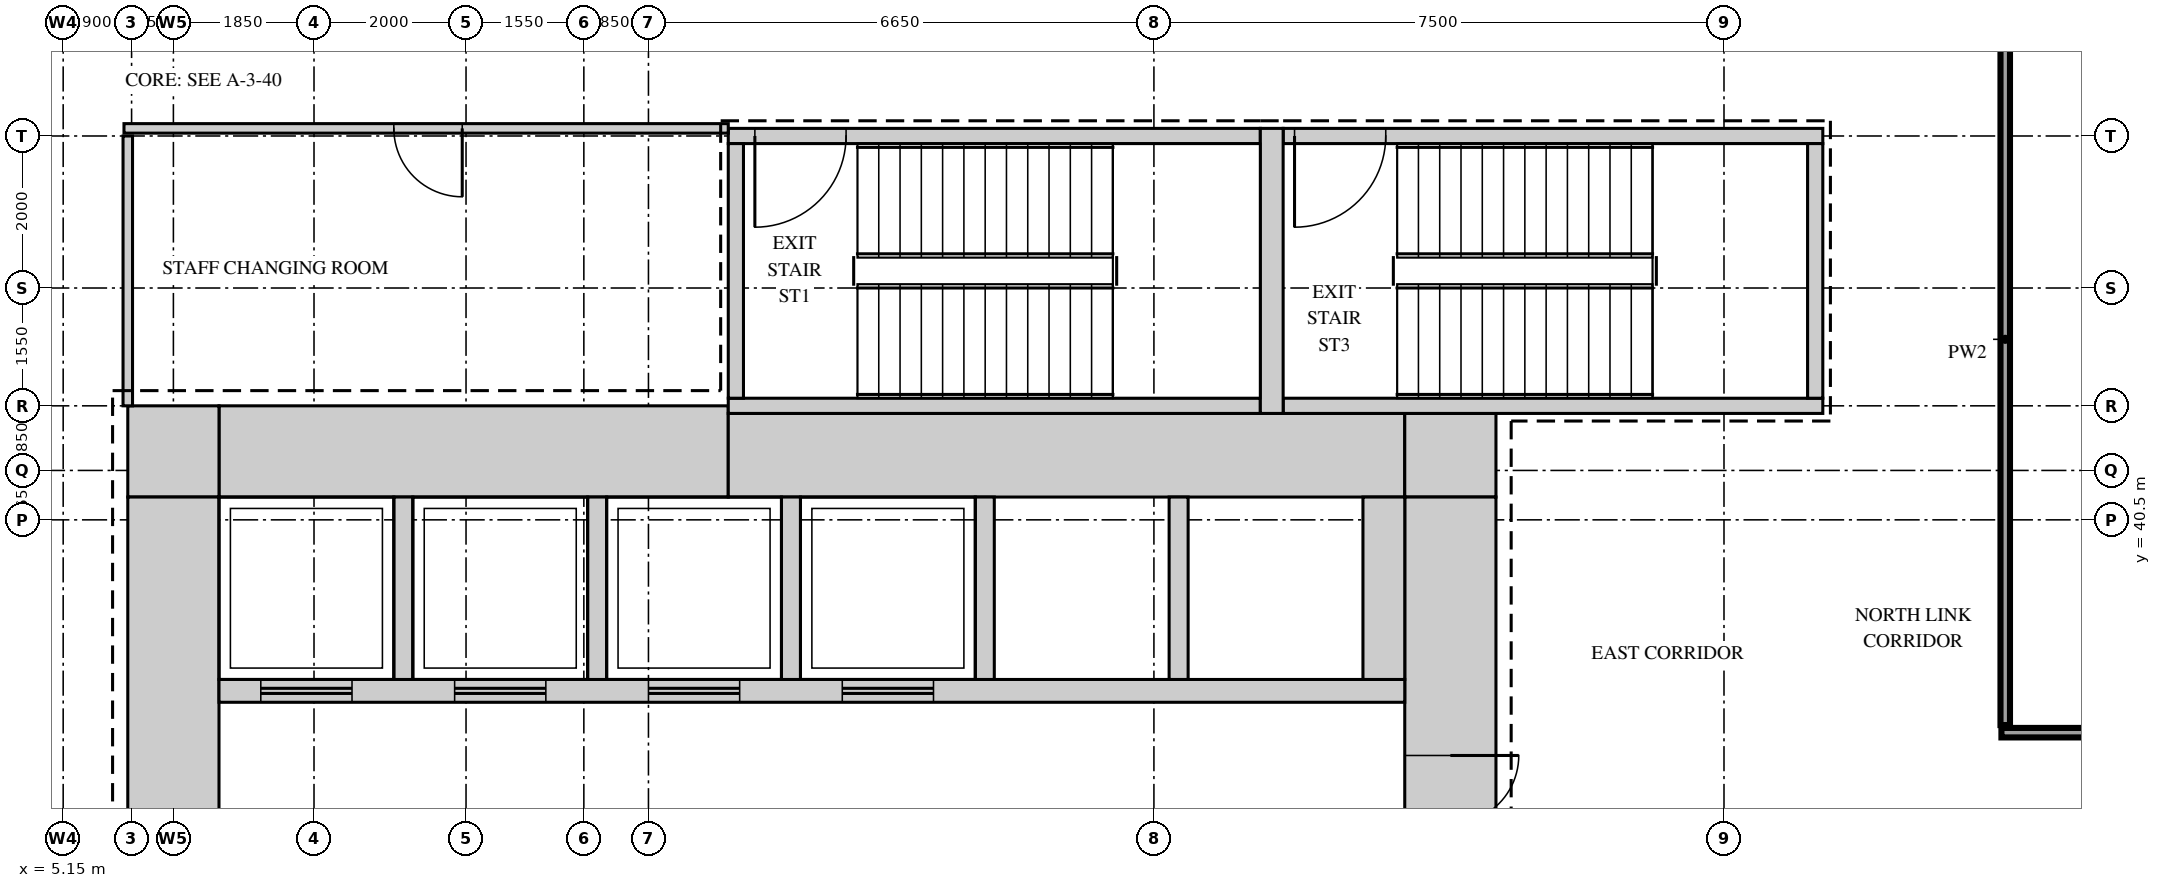
"""IFC4 building model, lengths in metres.
Left out: names, types, materials, properties, quantities, classifications, styles, units other than length and angle.
Written with IfcOpenShell. Run it as: python <this file> out.ifc"""

import sys

from ifc_helpers import new_model, si_unit, direction, frame, frame_2d, origin, place, context, subcontext, project, spatial, rectangle, extrude, source, transform, mapped, element, fill, save


model = new_model("IFC4")
c1 = context("Model", 3, precision=1e-05, world=origin(), true_north=direction((0.0, 1.0)))
c2 = subcontext(c1, "Body", "Model", "MODEL_VIEW")
j1 = project(units=[si_unit("LENGTHUNIT", "METRE"), si_unit("PLANEANGLEUNIT", "RADIAN")], contexts=[c1])
p1 = place(None, origin())
s1 = spatial("IfcSite", under=j1, at=p1, CompositionType="ELEMENT")
p2 = place(p1, origin())
s2 = spatial("IfcBuilding", under=s1, at=p2, CompositionType="ELEMENT")
p3 = place(p2, frame((0.0, 0.0, 73.5)))
s3 = spatial("IfcBuildingStorey", under=s2, at=p3, CompositionType="ELEMENT", Elevation=73.5)
m1 = source(origin(), c2, "Body", "SweptSolid", [
    extrude(rectangle(XDim=6.7, YDim=1.2, at=frame_2d((3.35, 0.0))), origin(), (0.0, 0.0, 1.0), 4.2),
])
p4 = place(p3, frame((7.2, 41.4, 0.0), z_axis=(0.0, 0.0, 1.0), x_axis=(1.0, 0.0, 0.0)))
e1 = element("IfcWall", 1, at=p4, inside=s3, PredefinedType="SHEAR", context=c2, shape_type="MappedRepresentation", body=[
    mapped(m1, transform((0.0, 0.0, 0.0))),
])
m2 = source(origin(), c2, "Body", "SweptSolid", [
    extrude(rectangle(XDim=8.9, YDim=1.1, at=frame_2d((4.45, 0.0))), origin(), (0.0, 0.0, 1.0), 4.2),
])
p5 = place(p3, frame((13.9, 41.35, 0.0), z_axis=(0.0, 0.0, 1.0), x_axis=(1.0, 0.0, 0.0)))
e2 = element("IfcWall", 2, at=p5, inside=s3, PredefinedType="SHEAR", context=c2, shape_type="MappedRepresentation", body=[
    mapped(m2, transform((0.0, 0.0, 0.0))),
])
m3 = source(origin(), c2, "Body", "SweptSolid", [
    extrude(rectangle(XDim=1.2, YDim=1.1, at=frame_2d((0.6, 0.0))), origin(), (0.0, 0.0, 1.0), 4.2),
])
p6 = place(p3, frame((22.8, 41.35, 0.0), z_axis=(0.0, 0.0, 1.0), x_axis=(1.0, 0.0, 0.0)))
e3 = element("IfcWall", 3, at=p6, inside=s3, PredefinedType="SHEAR", context=c2, shape_type="MappedRepresentation", body=[
    mapped(m3, transform((0.0, 0.0, 0.0))),
])
m4 = source(origin(), c2, "Body", "SweptSolid", [
    extrude(rectangle(XDim=1.2, YDim=1.2, at=frame_2d((0.6, 0.0))), origin(), (0.0, 0.0, 1.0), 4.2),
])
p7 = place(p3, frame((6.0, 41.4, 0.0), z_axis=(0.0, 0.0, 1.0), x_axis=(1.0, 0.0, 0.0)))
e4 = element("IfcWall", 4, at=p7, inside=s3, PredefinedType="SHEAR", context=c2, shape_type="MappedRepresentation", body=[
    mapped(m4, transform((0.0, 0.0, 0.0))),
])
m5 = source(origin(), c2, "Body", "SweptSolid", [
    extrude(rectangle(XDim=27.6, YDim=1.2, at=frame_2d((13.8, 0.0))), origin(), (0.0, 0.0, 1.0), 4.2),
])
p8 = place(p3, frame((23.4, 13.2, 0.0), z_axis=(0.0, 0.0, 1.0), x_axis=(0.0, 1.0, 0.0)))
e5 = element("IfcWall", 5, at=p8, inside=s3, PredefinedType="SHEAR", context=c2, shape_type="MappedRepresentation", body=[
    mapped(m5, transform((0.0, 0.0, 0.0))),
])
m6 = source(origin(), c2, "Body", "SweptSolid", [
    extrude(rectangle(XDim=1.8, YDim=2.1, at=frame_2d((0.9, 1.05))), frame((0.0, 0.61, 0.0), z_axis=(0.0, -1.0, 0.0), x_axis=(1.0, 0.0, 0.0)), (0.0, 0.0, 1.0), 1.22),
])
p9 = place(p8, frame((22.4, 0.0, 0.0)))
e6 = element("IfcOpeningElement", 6, at=p9, cuts=e5, PredefinedType="OPENING", context=c2, shape_type="MappedRepresentation", body=[
    mapped(m6, transform((0.0, 0.0, 0.0))),
])
m7 = source(origin(), c2, "Body", "SweptSolid", [
    extrude(rectangle(XDim=1.2, YDim=2.1, at=frame_2d((0.6, 1.05))), frame((0.0, 0.61, 0.0), z_axis=(0.0, -1.0, 0.0), x_axis=(1.0, 0.0, 0.0)), (0.0, 0.0, 1.0), 1.22),
])
p10 = place(p8, frame((14.4, 0.0, 0.0)))
e7 = element("IfcOpeningElement", 7, at=p10, cuts=e5, PredefinedType="OPENING", context=c2, shape_type="MappedRepresentation", body=[
    mapped(m7, transform((0.0, 0.0, 0.0))),
])
m8 = source(origin(), c2, "Body", "SweptSolid", [
    extrude(rectangle(XDim=0.9, YDim=2.1, at=frame_2d((0.45, 1.05))), frame((0.0, 0.61, 0.0), z_axis=(0.0, -1.0, 0.0), x_axis=(1.0, 0.0, 0.0)), (0.0, 0.0, 1.0), 1.22),
])
p11 = place(p8, frame((1.15, 0.0, 0.0)))
e8 = element("IfcOpeningElement", 8, at=p11, cuts=e5, PredefinedType="OPENING", context=c2, shape_type="MappedRepresentation", body=[
    mapped(m8, transform((0.0, 0.0, 0.0))),
])
p12 = place(p8, frame((6.0, 0.0, 0.0)))
e9 = element("IfcOpeningElement", 9, at=p12, cuts=e5, PredefinedType="OPENING", context=c2, shape_type="MappedRepresentation", body=[
    mapped(m8, transform((0.0, 0.0, 0.0))),
])
p13 = place(p3, frame((6.6, 13.2, 0.0), z_axis=(0.0, 0.0, 1.0), x_axis=(0.0, 1.0, 0.0)))
e10 = element("IfcWall", 10, at=p13, inside=s3, PredefinedType="SHEAR", context=c2, shape_type="MappedRepresentation", body=[
    mapped(m5, transform((0.0, 0.0, 0.0))),
])
m9 = source(origin(), c2, "Body", "SweptSolid", [
    extrude(rectangle(XDim=7.0, YDim=0.2, at=frame_2d((3.5, 0.0))), origin(), (0.0, 0.0, 1.0), 4.2),
])
p14 = place(p3, frame((13.9, 45.55, 0.0), z_axis=(0.0, 0.0, 1.0), x_axis=(1.0, 0.0, 0.0)))
e11 = element("IfcWall", 11, at=p14, inside=s3, PredefinedType="SHEAR", context=c2, shape_type="MappedRepresentation", body=[
    mapped(m9, transform((0.0, 0.0, 0.0))),
])
m10 = source(origin(), c2, "Body", "SweptSolid", [
    extrude(rectangle(XDim=1.2, YDim=2.1, at=frame_2d((0.6, 1.05))), frame((0.0, 0.11, 0.0), z_axis=(0.0, -1.0, 0.0), x_axis=(1.0, 0.0, 0.0)), (0.0, 0.0, 1.0), 0.22),
])
p15 = place(p14, frame((0.35, 0.0, 0.0)))
e12 = element("IfcOpeningElement", 12, at=p15, cuts=e11, PredefinedType="OPENING", context=c2, shape_type="MappedRepresentation", body=[
    mapped(m10, transform((0.0, 0.0, 0.0))),
])
p16 = place(p3, frame((13.9, 42.0, 0.0), z_axis=(0.0, 0.0, 1.0), x_axis=(1.0, 0.0, 0.0)))
e13 = element("IfcWall", 13, at=p16, inside=s3, PredefinedType="SHEAR", context=c2, shape_type="MappedRepresentation", body=[
    mapped(m9, transform((0.0, 0.0, 0.0))),
])
m11 = source(origin(), c2, "Body", "SweptSolid", [
    extrude(rectangle(XDim=7.1, YDim=0.2, at=frame_2d((3.55, 0.0))), origin(), (0.0, 0.0, 1.0), 4.2),
])
p17 = place(p3, frame((21.2, 45.55, 0.0), z_axis=(0.0, 0.0, 1.0), x_axis=(1.0, 0.0, 0.0)))
e14 = element("IfcWall", 14, at=p17, inside=s3, PredefinedType="SHEAR", context=c2, shape_type="MappedRepresentation", body=[
    mapped(m11, transform((0.0, 0.0, 0.0))),
])
p18 = place(p17, frame((0.15, 0.0, 0.0)))
e15 = element("IfcOpeningElement", 15, at=p18, cuts=e14, PredefinedType="OPENING", context=c2, shape_type="MappedRepresentation", body=[
    mapped(m10, transform((0.0, 0.0, 0.0))),
])
p19 = place(p3, frame((21.2, 42.0, 0.0), z_axis=(0.0, 0.0, 1.0), x_axis=(1.0, 0.0, 0.0)))
e16 = element("IfcWall", 16, at=p19, inside=s3, PredefinedType="SHEAR", context=c2, shape_type="MappedRepresentation", body=[
    mapped(m11, transform((0.0, 0.0, 0.0))),
])
m12 = source(origin(), c2, "Body", "SweptSolid", [
    extrude(rectangle(XDim=3.75, YDim=0.3, at=frame_2d((1.875, 0.0))), origin(), (0.0, 0.0, 1.0), 4.2),
])
p20 = place(p3, frame((21.05, 41.9, 0.0), z_axis=(0.0, 0.0, 1.0), x_axis=(0.0, 1.0, 0.0)))
e17 = element("IfcWall", 17, at=p20, inside=s3, PredefinedType="SHEAR", context=c2, shape_type="MappedRepresentation", body=[
    mapped(m12, transform((0.0, 0.0, 0.0))),
])
m13 = source(origin(), c2, "Body", "SweptSolid", [
    extrude(rectangle(XDim=3.35, YDim=0.2, at=frame_2d((1.675, 0.0))), origin(), (0.0, 0.0, 1.0), 4.2),
])
for number, where, z_axis, x_axis in (
    (18, (14.0, 42.1, 0.0), (0.0, 0.0, 1.0), (0.0, 1.0, 0.0)),
    (19, (28.2, 42.1, 0.0), (0.0, 0.0, 1.0), (0.0, 1.0, 0.0)),
):
    element("IfcWall", number, at=place(p3, frame(where, z_axis=z_axis, x_axis=x_axis)), inside=s3, PredefinedType="SHEAR", context=c2, shape_type="MappedRepresentation", body=[
        mapped(m13, transform((0.0, 0.0, 0.0))),
    ])
m14 = source(origin(), c2, "Body", "SweptSolid", [
    extrude(rectangle(XDim=15.6, YDim=0.3, at=frame_2d((7.8, 0.0))), origin(), (0.0, 0.0, 1.0), 4.2),
])
p21 = place(p3, frame((7.2, 38.25, 0.0), z_axis=(0.0, 0.0, 1.0), x_axis=(1.0, 0.0, 0.0)))
e20 = element("IfcWall", 20, at=p21, inside=s3, PredefinedType="STANDARD", context=c2, shape_type="MappedRepresentation", body=[
    mapped(m14, transform((0.0, 0.0, 0.0))),
])
m15 = source(origin(), c2, "Body", "SweptSolid", [
    extrude(rectangle(XDim=1.2, YDim=2.1, at=frame_2d((0.6, 1.05))), frame((0.0, 0.16, 0.0), z_axis=(0.0, -1.0, 0.0), x_axis=(1.0, 0.0, 0.0)), (0.0, 0.0, 1.0), 0.32),
])
p22 = place(p21, frame((0.55, 0.0, 0.0)))
e21 = element("IfcOpeningElement", 21, at=p22, cuts=e20, PredefinedType="OPENING", context=c2, shape_type="MappedRepresentation", body=[
    mapped(m15, transform((0.0, 0.0, 0.0))),
])
p23 = place(p21, frame((3.1, 0.0, 0.0)))
e22 = element("IfcOpeningElement", 22, at=p23, cuts=e20, PredefinedType="OPENING", context=c2, shape_type="MappedRepresentation", body=[
    mapped(m15, transform((0.0, 0.0, 0.0))),
])
p24 = place(p21, frame((5.65, 0.0, 0.0)))
e23 = element("IfcOpeningElement", 23, at=p24, cuts=e20, PredefinedType="OPENING", context=c2, shape_type="MappedRepresentation", body=[
    mapped(m15, transform((0.0, 0.0, 0.0))),
])
p25 = place(p21, frame((8.2, 0.0, 0.0)))
e24 = element("IfcOpeningElement", 24, at=p25, cuts=e20, PredefinedType="OPENING", context=c2, shape_type="MappedRepresentation", body=[
    mapped(m15, transform((0.0, 0.0, 0.0))),
])
m16 = source(origin(), c2, "Body", "SweptSolid", [
    extrude(rectangle(XDim=2.4, YDim=0.25, at=frame_2d((1.2, 0.0))), origin(), (0.0, 0.0, 1.0), 4.2),
])
for number, where, z_axis, x_axis in (
    (25, (9.625, 38.4, 0.0), (0.0, 0.0, 1.0), (0.0, 1.0, 0.0)),
    (26, (12.175, 38.4, 0.0), (0.0, 0.0, 1.0), (0.0, 1.0, 0.0)),
    (27, (14.725, 38.4, 0.0), (0.0, 0.0, 1.0), (0.0, 1.0, 0.0)),
    (28, (17.275, 38.4, 0.0), (0.0, 0.0, 1.0), (0.0, 1.0, 0.0)),
    (29, (19.825, 38.4, 0.0), (0.0, 0.0, 1.0), (0.0, 1.0, 0.0)),
):
    element("IfcWall", number, at=place(p3, frame(where, z_axis=z_axis, x_axis=x_axis)), inside=s3, PredefinedType="STANDARD", context=c2, shape_type="MappedRepresentation", body=[
        mapped(m16, transform((0.0, 0.0, 0.0))),
    ])
m17 = source(origin(), c2, "Body", "SweptSolid", [
    extrude(rectangle(XDim=2.4, YDim=0.55, at=frame_2d((1.2, 0.0))), origin(), (0.0, 0.0, 1.0), 4.2),
])
p26 = place(p3, frame((22.525, 38.4, 0.0), z_axis=(0.0, 0.0, 1.0), x_axis=(0.0, 1.0, 0.0)))
e30 = element("IfcWall", 30, at=p26, inside=s3, PredefinedType="STANDARD", context=c2, shape_type="MappedRepresentation", body=[
    mapped(m17, transform((0.0, 0.0, 0.0))),
])
m18 = source(origin(), c2, "Body", "SweptSolid", [
    extrude(rectangle(XDim=23.2, YDim=0.125, at=frame_2d((11.6, 0.0))), origin(), (0.0, 0.0, 1.0), 4.3),
])
p27 = place(p3, frame((30.65, 37.7, 0.0), z_axis=(0.0, 0.0, 1.0), x_axis=(1.0, 0.0, 0.0)))
e31 = element("IfcWall", 31, at=p27, inside=s3, PredefinedType="PARTITIONING", context=c2, shape_type="MappedRepresentation", body=[
    mapped(m18, transform((0.0, 0.0, 0.0))),
])
m19 = source(origin(), c2, "Body", "SweptSolid", [
    extrude(rectangle(XDim=1.2, YDim=2.1, at=frame_2d((0.6, 1.05))), frame((0.0, 0.073, 0.0), z_axis=(0.0, -1.0, 0.0), x_axis=(1.0, 0.0, 0.0)), (0.0, 0.0, 1.0), 0.145),
])
p28 = place(p27, frame((5.25, 0.0, 0.0)))
e32 = element("IfcOpeningElement", 32, at=p28, cuts=e31, PredefinedType="OPENING", context=c2, shape_type="MappedRepresentation", body=[
    mapped(m19, transform((0.0, 0.0, 0.0))),
])
p29 = place(p27, frame((16.75, 0.0, 0.0)))
e33 = element("IfcOpeningElement", 33, at=p29, cuts=e31, PredefinedType="OPENING", context=c2, shape_type="MappedRepresentation", body=[
    mapped(m19, transform((0.0, 0.0, 0.0))),
])
m20 = source(origin(), c2, "Body", "SweptSolid", [
    extrude(rectangle(XDim=10.15, YDim=0.125, at=frame_2d((5.075, 0.0))), origin(), (0.0, 0.0, 1.0), 4.3),
])
p30 = place(p3, frame((30.7, 37.8, 0.0), z_axis=(0.0, 0.0, 1.0), x_axis=(0.0, 1.0, 0.0)))
e34 = element("IfcWall", 34, at=p30, inside=s3, PredefinedType="PARTITIONING", context=c2, shape_type="MappedRepresentation", body=[
    mapped(m20, transform((0.0, 0.0, 0.0))),
])
m21 = source(origin(), c2, "Body", "SweptSolid", [
    extrude(rectangle(XDim=3.55, YDim=0.125, at=frame_2d((1.775, 0.0))), origin(), (0.0, 0.0, 1.0), 4.3),
])
p31 = place(p3, frame((6.0, 42.0, 0.0), z_axis=(0.0, 0.0, 1.0), x_axis=(0.0, 1.0, 0.0)))
e35 = element("IfcWall", 35, at=p31, inside=s3, PredefinedType="PARTITIONING", context=c2, shape_type="MappedRepresentation", body=[
    mapped(m21, transform((0.0, 0.0, 0.0))),
])
m22 = source(origin(), c2, "Body", "SweptSolid", [
    extrude(rectangle(XDim=7.95, YDim=0.125, at=frame_2d((3.975, 0.0))), origin(), (0.0, 0.0, 1.0), 4.3),
])
p32 = place(p3, frame((5.95, 45.65, 0.0), z_axis=(0.0, 0.0, 1.0), x_axis=(1.0, 0.0, 0.0)))
e36 = element("IfcWall", 36, at=p32, inside=s3, PredefinedType="PARTITIONING", context=c2, shape_type="MappedRepresentation", body=[
    mapped(m22, transform((0.0, 0.0, 0.0))),
])
m23 = source(origin(), c2, "Body", "SweptSolid", [
    extrude(rectangle(XDim=0.9, YDim=2.1, at=frame_2d((0.45, 1.05))), frame((0.0, 0.073, 0.0), z_axis=(0.0, -1.0, 0.0), x_axis=(1.0, 0.0, 0.0)), (0.0, 0.0, 1.0), 0.145),
])
p33 = place(p32, frame((3.55, 0.0, 0.0)))
e37 = element("IfcOpeningElement", 37, at=p33, cuts=e36, PredefinedType="OPENING", context=c2, shape_type="MappedRepresentation", body=[
    mapped(m23, transform((0.0, 0.0, 0.0))),
])
m24 = source(origin(), c2, "Body", "SweptSolid", [
    extrude(rectangle(XDim=1.8, YDim=2.1, at=frame_2d((0.9, 1.05))), frame((0.0, 0.55, 0.0), z_axis=(0.0, -1.0, 0.0), x_axis=(1.0, 0.0, 0.0)), (0.0, 0.0, 1.0), 1.1),
])
p34 = place(p9, origin())
e38 = element("IfcDoor", 38, at=p34, inside=s3, OperationType="DOUBLE_DOOR_SINGLE_SWING", PredefinedType="DOOR", context=c2, shape_type="MappedRepresentation", body=[
    mapped(m24, transform((0.0, 0.0, 0.0))),
])
fill(e6, e38)
m25 = source(origin(), c2, "Body", "SweptSolid", [
    extrude(rectangle(XDim=0.9, YDim=2.1, at=frame_2d((0.45, 1.05))), frame((0.0, 0.025, 0.0), z_axis=(0.0, -1.0, 0.0), x_axis=(1.0, 0.0, 0.0)), (0.0, 0.0, 1.0), 0.05),
])
p35 = place(p33, origin())
e39 = element("IfcDoor", 39, at=p35, inside=s3, OperationType="SINGLE_SWING_RIGHT", PredefinedType="DOOR", context=c2, shape_type="MappedRepresentation", body=[
    mapped(m25, transform((0.0, 0.0, 0.0))),
])
fill(e37, e39)
m26 = source(origin(), c2, "Body", "SweptSolid", [
    extrude(rectangle(XDim=1.2, YDim=2.1, at=frame_2d((0.6, 1.05))), frame((0.0, 0.025, 0.0), z_axis=(0.0, -1.0, 0.0), x_axis=(1.0, 0.0, 0.0)), (0.0, 0.0, 1.0), 0.05),
])
p36 = place(p15, origin())
e40 = element("IfcDoor", 40, at=p36, inside=s3, OperationType="SINGLE_SWING_LEFT", PredefinedType="DOOR", context=c2, shape_type="MappedRepresentation", body=[
    mapped(m26, transform((0.0, 0.0, 0.0))),
])
fill(e12, e40)
p37 = place(p18, origin())
e41 = element("IfcDoor", 41, at=p37, inside=s3, OperationType="SINGLE_SWING_LEFT", PredefinedType="DOOR", context=c2, shape_type="MappedRepresentation", body=[
    mapped(m26, transform((0.0, 0.0, 0.0))),
])
fill(e15, e41)
p38 = place(p22, origin())
e42 = element("IfcDoor", 42, at=p38, inside=s3, OperationType="DOUBLE_DOOR_SLIDING", PredefinedType="DOOR", context=c2, shape_type="MappedRepresentation", body=[
    mapped(m26, transform((0.0, 0.0, 0.0))),
])
fill(e21, e42)
p39 = place(p23, origin())
e43 = element("IfcDoor", 43, at=p39, inside=s3, OperationType="DOUBLE_DOOR_SLIDING", PredefinedType="DOOR", context=c2, shape_type="MappedRepresentation", body=[
    mapped(m26, transform((0.0, 0.0, 0.0))),
])
fill(e22, e43)
p40 = place(p24, origin())
e44 = element("IfcDoor", 44, at=p40, inside=s3, OperationType="DOUBLE_DOOR_SLIDING", PredefinedType="DOOR", context=c2, shape_type="MappedRepresentation", body=[
    mapped(m26, transform((0.0, 0.0, 0.0))),
])
fill(e23, e44)
p41 = place(p25, origin())
e45 = element("IfcDoor", 45, at=p41, inside=s3, OperationType="DOUBLE_DOOR_SLIDING", PredefinedType="DOOR", context=c2, shape_type="MappedRepresentation", body=[
    mapped(m26, transform((0.0, 0.0, 0.0))),
])
fill(e24, e45)
save(model, sys.argv[1])
